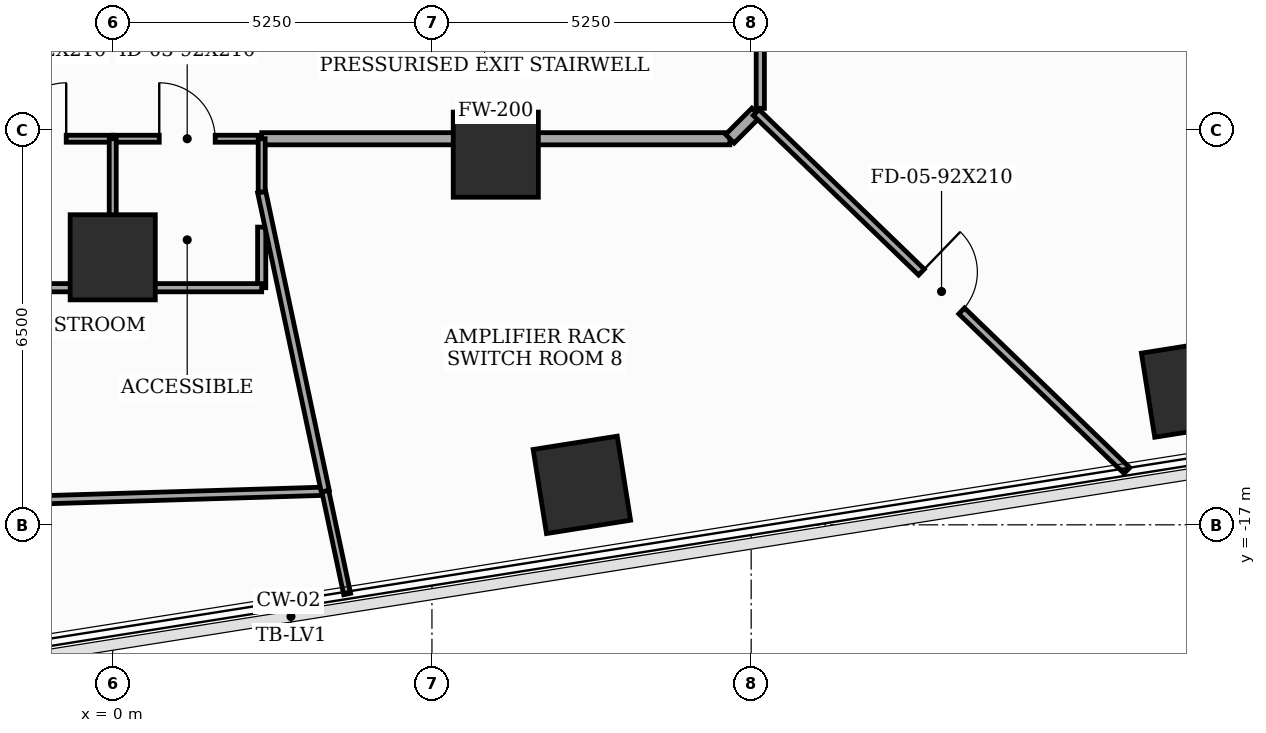
"""IFC4 building model, lengths in metres.
Left out: names, types, materials, properties, quantities, classifications, styles, units other than length and angle.
Written with IfcOpenShell. Run it as: python <this file> out.ifc"""

import sys

from ifc_helpers import new_model, si_unit, direction, frame, frame_2d, origin, origin_2d, place, context, subcontext, project, spatial, rectangle, extrude, element, fill, save


model = new_model("IFC4")
c1 = context("Model", 3, precision=1e-05, world=origin(), true_north=direction((0.0, 1.0)))
c2 = subcontext(c1, "Body", "Model", "MODEL_VIEW")
j1 = project(units=[si_unit("LENGTHUNIT", "METRE"), si_unit("PLANEANGLEUNIT", "RADIAN")], contexts=[c1])
p1 = place(None, origin())
s1 = spatial("IfcSite", under=j1, at=p1, CompositionType="ELEMENT")
p2 = place(p1, origin())
s2 = spatial("IfcBuilding", under=s1, at=p2, CompositionType="ELEMENT")
p3 = place(p2, frame((0.0, 0.0, 70.4)))
s3 = spatial("IfcBuildingStorey", under=s2, at=p3, CompositionType="ELEMENT", Elevation=70.4)
for number, where, z_axis, x_axis in (
    (1, (0.0, -12.6, 0.0), (0.0, 0.0, 1.0), (1.0, 0.0, 0.0)),
    (2, (6.3, -10.912, 0.0), (0.0, 0.0, 1.0), (1.0, 0.0, 0.0)),
    (3, (7.716, -16.343, 0.0), (0.0, 0.0, 1.0), (0.988, 0.156, 0.0)),
    (4, (17.719, -14.758, 0.0), (0.0, 0.0, 1.0), (0.988, 0.156, 0.0)),
):
    element("IfcColumn", number, at=place(p3, frame(where, z_axis=z_axis, x_axis=x_axis)), inside=s3, PredefinedType="COLUMN", context=c2, shape_type="SweptSolid", body=[
        extrude(rectangle(XDim=1.4, YDim=1.4, at=origin_2d()), origin(), (0.0, 0.0, 1.0), 3.7),
    ])
p4 = place(p3, frame((10.65, -10.15, 0.0), z_axis=(0.0, 0.0, 1.0), x_axis=(0.0, 1.0, 0.0)))
e5 = element("IfcWall", 5, at=p4, inside=s3, PredefinedType="PARTITIONING", context=c2, shape_type="SweptSolid", body=[
    extrude(rectangle(XDim=6.158, YDim=0.135, at=frame_2d((3.079, 0.0))), origin(), (0.0, 0.0, 1.0), 2.785),
])
p5 = place(p3, frame((-2.45, -10.65, 0.0), z_axis=(0.0, 0.0, 1.0), x_axis=(1.0, 0.0, 0.0)))
e6 = element("IfcWall", 6, at=p5, inside=s3, PredefinedType="PARTITIONING", context=c2, shape_type="SweptSolid", body=[
    extrude(rectangle(XDim=2.45, YDim=0.115, at=frame_2d((1.225, 0.0))), origin(), (0.0, 0.0, 1.0), 2.785),
])
p6 = place(p5, frame((0.765, 0.0, 0.0)))
e7 = element("IfcOpeningElement", 7, at=p6, cuts=e6, PredefinedType="OPENING", context=c2, shape_type="SweptSolid", body=[
    extrude(rectangle(XDim=0.92, YDim=2.1, at=frame_2d((0.46, 1.05))), frame((0.0, 0.067, 0.0), z_axis=(0.0, -1.0, 0.0), x_axis=(1.0, 0.0, 0.0)), (0.0, 0.0, 1.0), 0.135),
])
p7 = place(p3, frame((0.0, -10.65, 0.0), z_axis=(0.0, 0.0, 1.0), x_axis=(1.0, 0.0, 0.0)))
e8 = element("IfcWall", 8, at=p7, inside=s3, PredefinedType="PARTITIONING", context=c2, shape_type="SweptSolid", body=[
    extrude(rectangle(XDim=2.45, YDim=0.115, at=frame_2d((1.225, 0.0))), origin(), (0.0, 0.0, 1.0), 3.5),
])
p8 = place(p7, frame((0.765, 0.0, 0.0)))
e9 = element("IfcOpeningElement", 9, at=p8, cuts=e8, PredefinedType="OPENING", context=c2, shape_type="SweptSolid", body=[
    extrude(rectangle(XDim=0.92, YDim=2.1, at=frame_2d((0.46, 1.05))), frame((0.0, 0.067, 0.0), z_axis=(0.0, -1.0, 0.0), x_axis=(1.0, 0.0, 0.0)), (0.0, 0.0, 1.0), 0.135),
])
p9 = place(p3, frame((2.45, -10.65, 0.0), z_axis=(0.0, 0.0, 1.0), x_axis=(1.0, 0.0, 0.0)))
e10 = element("IfcWall", 10, at=p9, inside=s3, PredefinedType="SOLIDWALL", context=c2, shape_type="SweptSolid", body=[
    extrude(rectangle(XDim=7.7, YDim=0.2, at=frame_2d((3.85, 0.0))), origin(), (0.0, 0.0, 1.0), 2.785),
])
p10 = place(p3, frame((10.15, -10.65, 0.0), z_axis=(0.0, 0.0, 1.0), x_axis=(0.70730655707, 0.706906948845, 0.0)))
e11 = element("IfcWall", 11, at=p10, inside=s3, PredefinedType="SOLIDWALL", context=c2, shape_type="SweptSolid", body=[
    extrude(rectangle(XDim=0.611, YDim=0.2, at=frame_2d((0.305, 0.0))), origin(), (0.0, 0.0, 1.0), 3.5),
])
p11 = place(p3, frame((10.582, -10.218, 0.0), z_axis=(0.0, 0.0, 1.0), x_axis=(0.719282851578, -0.694717337789, 0.0)))
e12 = element("IfcWall", 12, at=p11, inside=s3, PredefinedType="PARTITIONING", context=c2, shape_type="SweptSolid", body=[
    extrude(rectangle(XDim=8.477, YDim=0.135, at=frame_2d((4.239, 0.0))), origin(), (0.0, 0.0, 1.0), 2.935),
])
p12 = place(p11, frame((3.779, 0.0, 0.0)))
e13 = element("IfcOpeningElement", 13, at=p12, cuts=e12, PredefinedType="OPENING", context=c2, shape_type="SweptSolid", body=[
    extrude(rectangle(XDim=0.92, YDim=2.1, at=frame_2d((0.46, 1.05))), frame((0.0, 0.077, 0.0), z_axis=(0.0, -1.0, 0.0), x_axis=(1.0, 0.0, 0.0)), (0.0, 0.0, 1.0), 0.155),
])
p13 = place(p3, frame((-2.935, -16.643, 0.0), z_axis=(0.0, 0.0, 1.0), x_axis=(0.999535697464, 0.030469484666, 0.0)))
e14 = element("IfcWall", 14, at=p13, inside=s3, PredefinedType="PARTITIONING", context=c2, shape_type="SweptSolid", body=[
    extrude(rectangle(XDim=6.434, YDim=0.135, at=frame_2d((3.217, 0.0))), origin(), (0.0, 0.0, 1.0), 2.785),
])
p14 = place(p3, frame((0.0, -13.1, 0.0), z_axis=(0.0, 0.0, 1.0), x_axis=(-1.0, 0.0, 0.0)))
e15 = element("IfcWall", 15, at=p14, inside=s3, PredefinedType="PARTITIONING", context=c2, shape_type="SweptSolid", body=[
    extrude(rectangle(XDim=2.45, YDim=0.135, at=frame_2d((1.225, 0.0))), origin(), (0.0, 0.0, 1.0), 2.785),
])
p15 = place(p3, frame((2.45, -12.103, 0.0), z_axis=(0.0, 0.0, 1.0), x_axis=(0.0, -1.0, 0.0)))
e16 = element("IfcWall", 16, at=p15, inside=s3, PredefinedType="PARTITIONING", context=c2, shape_type="SweptSolid", body=[
    extrude(rectangle(XDim=0.997, YDim=0.135, at=frame_2d((0.499, 0.0))), origin(), (0.0, 0.0, 1.0), 2.785),
])
p16 = place(p3, frame((2.45, -13.1, 0.0), z_axis=(0.0, 0.0, 1.0), x_axis=(-1.0, 0.0, 0.0)))
e17 = element("IfcWall", 17, at=p16, inside=s3, PredefinedType="PARTITIONING", context=c2, shape_type="SweptSolid", body=[
    extrude(rectangle(XDim=2.45, YDim=0.135, at=frame_2d((1.225, 0.0))), origin(), (0.0, 0.0, 1.0), 2.785),
])
p17 = place(p3, frame((3.496, -16.447, 0.0), z_axis=(0.0, 0.0, 1.0), x_axis=(-0.207934783689, 0.978142691908, 0.0)))
e18 = element("IfcWall", 18, at=p17, inside=s3, PredefinedType="PARTITIONING", context=c2, shape_type="SweptSolid", body=[
    extrude(rectangle(XDim=5.031, YDim=0.135, at=frame_2d((2.516, 0.0))), origin(), (0.0, 0.0, 1.0), 2.785),
])
p18 = place(p3, frame((3.855, -18.139, 0.0), z_axis=(0.0, 0.0, 1.0), x_axis=(-0.207667958155, 0.978199375974, 0.0)))
e19 = element("IfcWall", 19, at=p18, inside=s3, PredefinedType="PARTITIONING", context=c2, shape_type="SweptSolid", body=[
    extrude(rectangle(XDim=1.729, YDim=0.115, at=frame_2d((0.865, 0.0))), origin(), (0.0, 0.0, 1.0), 2.935),
])
p19 = place(p3, frame((0.0, -13.1, 0.0), z_axis=(0.0, 0.0, 1.0), x_axis=(0.0, 1.0, 0.0)))
e20 = element("IfcWall", 20, at=p19, inside=s3, PredefinedType="PARTITIONING", context=c2, shape_type="SweptSolid", body=[
    extrude(rectangle(XDim=2.45, YDim=0.115, at=frame_2d((1.225, 0.0))), origin(), (0.0, 0.0, 1.0), 2.785),
])
p20 = place(p3, frame((2.45, -11.526, 0.0), z_axis=(0.0, 0.0, 1.0), x_axis=(0.0, 1.0, 0.0)))
e21 = element("IfcWall", 21, at=p20, inside=s3, PredefinedType="PARTITIONING", context=c2, shape_type="SweptSolid", body=[
    extrude(rectangle(XDim=0.876, YDim=0.115, at=frame_2d((0.438, 0.0))), origin(), (0.0, 0.0, 1.0), 3.5),
])
p21 = place(p6, origin())
e22 = element("IfcDoor", 22, at=p21, inside=s3, OperationType="SINGLE_SWING_RIGHT", PredefinedType="DOOR", context=c2, shape_type="SweptSolid", body=[
    extrude(rectangle(XDim=0.92, YDim=2.1, at=frame_2d((0.46, 1.05))), frame((0.0, 0.025, 0.0), z_axis=(0.0, -1.0, 0.0), x_axis=(1.0, 0.0, 0.0)), (0.0, 0.0, 1.0), 0.05),
])
fill(e7, e22)
p22 = place(p8, origin())
e23 = element("IfcDoor", 23, at=p22, inside=s3, OperationType="SINGLE_SWING_LEFT", PredefinedType="DOOR", context=c2, shape_type="SweptSolid", body=[
    extrude(rectangle(XDim=0.92, YDim=2.1, at=frame_2d((0.46, 1.05))), frame((0.0, 0.025, 0.0), z_axis=(0.0, -1.0, 0.0), x_axis=(1.0, 0.0, 0.0)), (0.0, 0.0, 1.0), 0.05),
])
fill(e9, e23)
p23 = place(p12, origin())
e24 = element("IfcDoor", 24, at=p23, inside=s3, OperationType="SINGLE_SWING_LEFT", PredefinedType="DOOR", context=c2, shape_type="SweptSolid", body=[
    extrude(rectangle(XDim=0.92, YDim=2.1, at=frame_2d((0.46, 1.05))), frame((0.0, 0.025, 0.0), z_axis=(0.0, -1.0, 0.0), x_axis=(1.0, 0.0, 0.0)), (0.0, 0.0, 1.0), 0.05),
])
fill(e13, e24)
save(model, sys.argv[1])
